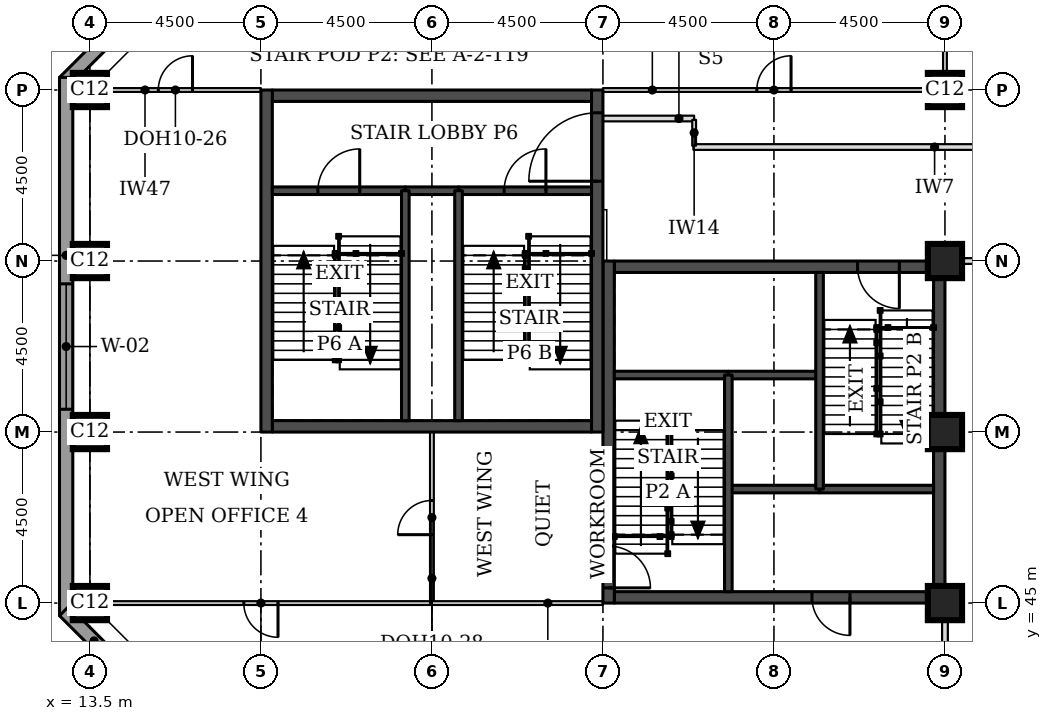
"""IFC4 building model, lengths in metres.
Left out: names, types, materials, properties, quantities, classifications, styles, units other than length and angle.
Written with IfcOpenShell. Run it as: python <this file> out.ifc"""

import sys

from ifc_helpers import new_model, si_unit, direction, frame, frame_2d, origin, origin_2d, place, context, subcontext, project, spatial, rectangle, extrude, element, fill, save


model = new_model("IFC4")
c1 = context("Model", 3, precision=1e-05, world=origin(), true_north=direction((0.0, 1.0)))
c2 = subcontext(c1, "Body", "Model", "MODEL_VIEW")
j1 = project(units=[si_unit("LENGTHUNIT", "METRE"), si_unit("PLANEANGLEUNIT", "RADIAN")], contexts=[c1])
p1 = place(None, origin())
s1 = spatial("IfcSite", under=j1, at=p1, CompositionType="ELEMENT")
p2 = place(p1, origin())
s2 = spatial("IfcBuilding", under=s1, at=p2, CompositionType="ELEMENT")
p3 = place(p2, frame((0.0, 0.0, 226.7)))
s3 = spatial("IfcBuildingStorey", under=s2, at=p3, CompositionType="ELEMENT", Elevation=226.7)
for number, where, z_axis, x_axis in (
    (1, (13.5, 45.0, 0.0), (0.0, 0.0, 1.0), (1.0, 0.0, 0.0)),
    (2, (36.0, 45.0, 0.0), (0.0, 0.0, 1.0), (1.0, 0.0, 0.0)),
    (3, (13.5, 49.5, 0.0), (0.0, 0.0, 1.0), (1.0, 0.0, 0.0)),
    (4, (36.0, 49.5, 0.0), (0.0, 0.0, 1.0), (1.0, 0.0, 0.0)),
    (5, (13.5, 54.0, 0.0), (0.0, 0.0, 1.0), (1.0, 0.0, 0.0)),
    (6, (36.0, 54.0, 0.0), (0.0, 0.0, 1.0), (1.0, 0.0, 0.0)),
    (7, (13.5, 58.5, 0.0), (0.0, 0.0, 1.0), (1.0, 0.0, 0.0)),
    (8, (36.0, 58.5, 0.0), (0.0, 0.0, 1.0), (1.0, 0.0, 0.0)),
):
    element("IfcColumn", number, at=place(p3, frame(where, z_axis=z_axis, x_axis=x_axis)), inside=s3, PredefinedType="COLUMN", context=c2, shape_type="SweptSolid", body=[
        extrude(rectangle(XDim=0.9, YDim=0.9, at=origin_2d()), origin(), (0.0, 0.0, 1.0), 3.7),
    ])
p4 = place(p3, frame((27.3, 45.15, 0.0), z_axis=(0.0, 0.0, 1.0), x_axis=(1.0, 0.0, 0.0)))
e9 = element("IfcWall", 9, at=p4, inside=s3, PredefinedType="SHEAR", context=c2, shape_type="SweptSolid", body=[
    extrude(rectangle(XDim=8.4, YDim=0.3, at=frame_2d((4.2, 0.0))), origin(), (0.0, 0.0, 1.0), 3.7),
])
p5 = place(p4, frame((5.2, 0.0, 0.0)))
e10 = element("IfcOpeningElement", 10, at=p5, cuts=e9, PredefinedType="OPENING", context=c2, shape_type="SweptSolid", body=[
    extrude(rectangle(XDim=1.0, YDim=2.1, at=frame_2d((0.5, 1.05))), frame((0.0, 0.16, 0.0), z_axis=(0.0, -1.0, 0.0), x_axis=(1.0, 0.0, 0.0)), (0.0, 0.0, 1.0), 0.32),
])
p6 = place(p3, frame((27.3, 53.85, 0.0), z_axis=(0.0, 0.0, 1.0), x_axis=(1.0, 0.0, 0.0)))
e11 = element("IfcWall", 11, at=p6, inside=s3, PredefinedType="SHEAR", context=c2, shape_type="SweptSolid", body=[
    extrude(rectangle(XDim=8.4, YDim=0.3, at=frame_2d((4.2, 0.0))), origin(), (0.0, 0.0, 1.0), 3.7),
])
p7 = place(p6, frame((6.4, 0.0, 0.0)))
e12 = element("IfcOpeningElement", 12, at=p7, cuts=e11, PredefinedType="OPENING", context=c2, shape_type="SweptSolid", body=[
    extrude(rectangle(XDim=1.1, YDim=2.1, at=frame_2d((0.55, 1.05))), frame((0.0, 0.16, 0.0), z_axis=(0.0, -1.0, 0.0), x_axis=(1.0, 0.0, 0.0)), (0.0, 0.0, 1.0), 0.32),
])
p8 = place(p3, frame((27.15, 45.0, 0.0), z_axis=(0.0, 0.0, 1.0), x_axis=(0.0, 1.0, 0.0)))
e13 = element("IfcWall", 13, at=p8, inside=s3, PredefinedType="SHEAR", context=c2, shape_type="SweptSolid", body=[
    extrude(rectangle(XDim=9.0, YDim=0.3, at=frame_2d((4.5, 0.0))), origin(), (0.0, 0.0, 1.0), 3.7),
])
p9 = place(p8, frame((0.4, 0.0, 0.0)))
e14 = element("IfcOpeningElement", 14, at=p9, cuts=e13, PredefinedType="OPENING", context=c2, shape_type="SweptSolid", body=[
    extrude(rectangle(XDim=1.1, YDim=2.1, at=frame_2d((0.55, 1.05))), frame((0.0, 0.16, 0.0), z_axis=(0.0, -1.0, 0.0), x_axis=(1.0, 0.0, 0.0)), (0.0, 0.0, 1.0), 0.32),
])
p10 = place(p3, frame((35.85, 45.0, 0.0), z_axis=(0.0, 0.0, 1.0), x_axis=(0.0, 1.0, 0.0)))
e15 = element("IfcWall", 15, at=p10, inside=s3, PredefinedType="SHEAR", context=c2, shape_type="SweptSolid", body=[
    extrude(rectangle(XDim=9.0, YDim=0.3, at=frame_2d((4.5, 0.0))), origin(), (0.0, 0.0, 1.0), 3.7),
])
for number, where, z_axis, x_axis in (
    (16, (18.3, 49.65, 0.0), (0.0, 0.0, 1.0), (1.0, 0.0, 0.0)),
    (17, (18.3, 58.35, 0.0), (0.0, 0.0, 1.0), (1.0, 0.0, 0.0)),
):
    element("IfcWall", number, at=place(p3, frame(where, z_axis=z_axis, x_axis=x_axis)), inside=s3, PredefinedType="SHEAR", context=c2, shape_type="SweptSolid", body=[
        extrude(rectangle(XDim=8.4, YDim=0.3, at=frame_2d((4.2, 0.0))), origin(), (0.0, 0.0, 1.0), 3.7),
    ])
p11 = place(p3, frame((18.15, 49.5, 0.0), z_axis=(0.0, 0.0, 1.0), x_axis=(0.0, 1.0, 0.0)))
e18 = element("IfcWall", 18, at=p11, inside=s3, PredefinedType="SHEAR", context=c2, shape_type="SweptSolid", body=[
    extrude(rectangle(XDim=9.0, YDim=0.3, at=frame_2d((4.5, 0.0))), origin(), (0.0, 0.0, 1.0), 3.7),
])
p12 = place(p3, frame((26.85, 49.5, 0.0), z_axis=(0.0, 0.0, 1.0), x_axis=(0.0, 1.0, 0.0)))
e19 = element("IfcWall", 19, at=p12, inside=s3, PredefinedType="SHEAR", context=c2, shape_type="SweptSolid", body=[
    extrude(rectangle(XDim=9.0, YDim=0.3, at=frame_2d((4.5, 0.0))), origin(), (0.0, 0.0, 1.0), 3.7),
])
p13 = place(p12, frame((6.6, 0.0, 0.0)))
e20 = element("IfcOpeningElement", 20, at=p13, cuts=e19, PredefinedType="OPENING", context=c2, shape_type="SweptSolid", body=[
    extrude(rectangle(XDim=1.8, YDim=2.1, at=frame_2d((0.9, 1.05))), frame((0.0, 0.16, 0.0), z_axis=(0.0, -1.0, 0.0), x_axis=(1.0, 0.0, 0.0)), (0.0, 0.0, 1.0), 0.32),
])
p14 = place(p3, frame((17.792, 63.676, 0.0), z_axis=(0.0, 0.0, 1.0), x_axis=(-0.707106781187, -0.707106781187, 0.0)))
e21 = element("IfcWall", 21, at=p14, inside=s3, PredefinedType="STANDARD", context=c2, shape_type="SweptSolid", body=[
    extrude(rectangle(XDim=7.027, YDim=0.35, at=frame_2d((3.513, 0.0))), origin(), (0.0, 0.0, 1.0), 3.525),
])
p15 = place(p14, frame((1.863, 0.0, 0.9)))
e22 = element("IfcOpeningElement", 22, at=p15, cuts=e21, PredefinedType="OPENING", context=c2, shape_type="SweptSolid", body=[
    extrude(rectangle(XDim=3.3, YDim=1.9, at=frame_2d((1.65, 0.95))), frame((0.0, 0.185, 0.0), z_axis=(0.0, -1.0, 0.0), x_axis=(1.0, 0.0, 0.0)), (0.0, 0.0, 1.0), 0.37),
])
p16 = place(p3, frame((12.875, 58.831, 0.0), z_axis=(0.0, 0.0, 1.0), x_axis=(0.0, -1.0, 0.0)))
e23 = element("IfcWall", 23, at=p16, inside=s3, PredefinedType="STANDARD", context=c2, shape_type="SweptSolid", body=[
    extrude(rectangle(XDim=14.163, YDim=0.35, at=frame_2d((7.081, 0.0))), origin(), (0.0, 0.0, 1.0), 3.525),
])
p17 = place(p16, frame((5.431, 0.0, 0.9)))
e24 = element("IfcOpeningElement", 24, at=p17, cuts=e23, PredefinedType="OPENING", context=c2, shape_type="SweptSolid", body=[
    extrude(rectangle(XDim=3.3, YDim=1.9, at=frame_2d((1.65, 0.95))), frame((0.0, 0.185, 0.0), z_axis=(0.0, -1.0, 0.0), x_axis=(1.0, 0.0, 0.0)), (0.0, 0.0, 1.0), 0.37),
])
p18 = place(p3, frame((12.824, 44.792, 0.0), z_axis=(0.0, 0.0, 1.0), x_axis=(0.707106781187, -0.707106781187, 0.0)))
e25 = element("IfcWall", 25, at=p18, inside=s3, PredefinedType="STANDARD", context=c2, shape_type="SweptSolid", body=[
    extrude(rectangle(XDim=7.027, YDim=0.35, at=frame_2d((3.513, 0.0))), origin(), (0.0, 0.0, 1.0), 3.525),
])
p19 = place(p18, frame((1.863, 0.0, 0.9)))
e26 = element("IfcOpeningElement", 26, at=p19, cuts=e25, PredefinedType="OPENING", context=c2, shape_type="SweptSolid", body=[
    extrude(rectangle(XDim=3.3, YDim=1.9, at=frame_2d((1.65, 0.95))), frame((0.0, 0.185, 0.0), z_axis=(0.0, -1.0, 0.0), x_axis=(1.0, 0.0, 0.0)), (0.0, 0.0, 1.0), 0.37),
])
p20 = place(p3, frame((36.45, 54.0, 0.0), z_axis=(0.0, 0.0, 1.0), x_axis=(1.0, 0.0, 0.0)))
e27 = element("IfcWall", 27, at=p20, inside=s3, PredefinedType="PARTITIONING", context=c2, shape_type="SweptSolid", body=[
    extrude(rectangle(XDim=5.625, YDim=0.15, at=frame_2d((2.812, 0.0))), origin(), (0.0, 0.0, 1.0), 3.55),
])
p21 = place(p3, frame((29.38, 57.0, 0.0), z_axis=(0.0, 0.0, 1.0), x_axis=(1.0, 0.0, 0.0)))
e28 = element("IfcWall", 28, at=p21, inside=s3, PredefinedType="PARTITIONING", context=c2, shape_type="SweptSolid", body=[
    extrude(rectangle(XDim=12.695, YDim=0.15, at=frame_2d((6.348, 0.0))), origin(), (0.0, 0.0, 1.0), 3.55),
])
p22 = place(p3, frame((36.0, 40.95, 0.0), z_axis=(0.0, 0.0, 1.0), x_axis=(0.0, 1.0, 0.0)))
e29 = element("IfcWall", 29, at=p22, inside=s3, PredefinedType="PARTITIONING", context=c2, shape_type="SweptSolid", body=[
    extrude(rectangle(XDim=3.63, YDim=0.15, at=frame_2d((1.815, 0.0))), origin(), (0.0, 0.0, 1.0), 2.8),
])
p23 = place(p22, frame((1.4, 0.0, 0.0)))
e30 = element("IfcOpeningElement", 30, at=p23, cuts=e29, PredefinedType="OPENING", context=c2, shape_type="SweptSolid", body=[
    extrude(rectangle(XDim=0.9, YDim=2.1, at=frame_2d((0.45, 1.05))), frame((0.0, 0.085, 0.0), z_axis=(0.0, -1.0, 0.0), x_axis=(1.0, 0.0, 0.0)), (0.0, 0.0, 1.0), 0.17),
])
p24 = place(p3, frame((36.0, 63.0, 0.0), z_axis=(0.0, 0.0, 1.0), x_axis=(0.0, -1.0, 0.0)))
e31 = element("IfcWall", 31, at=p24, inside=s3, PredefinedType="PARTITIONING", context=c2, shape_type="SweptSolid", body=[
    extrude(rectangle(XDim=4.5, YDim=0.1, at=frame_2d((2.25, 0.0))), origin(), (0.0, 0.0, 1.0), 2.8),
])
p25 = place(p3, frame((36.0, 58.5, 0.0), z_axis=(0.0, 0.0, 1.0), x_axis=(-1.0, 0.0, 0.0)))
e32 = element("IfcWall", 32, at=p25, inside=s3, PredefinedType="PARTITIONING", context=c2, shape_type="SweptSolid", body=[
    extrude(rectangle(XDim=9.0, YDim=0.1, at=frame_2d((4.5, 0.0))), origin(), (0.0, 0.0, 1.0), 2.55),
])
p26 = place(p25, frame((4.05, 0.0, 0.0)))
e33 = element("IfcOpeningElement", 33, at=p26, cuts=e32, PredefinedType="OPENING", context=c2, shape_type="SweptSolid", body=[
    extrude(rectangle(XDim=0.9, YDim=2.1, at=frame_2d((0.45, 1.05))), frame((0.0, 0.06, 0.0), z_axis=(0.0, -1.0, 0.0), x_axis=(1.0, 0.0, 0.0)), (0.0, 0.0, 1.0), 0.12),
])
p27 = place(p3, frame((13.5, 58.5, 0.0), z_axis=(0.0, 0.0, 1.0), x_axis=(1.0, 0.0, 0.0)))
e34 = element("IfcWall", 34, at=p27, inside=s3, PredefinedType="PARTITIONING", context=c2, shape_type="SweptSolid", body=[
    extrude(rectangle(XDim=4.5, YDim=0.1, at=frame_2d((2.25, 0.0))), origin(), (0.0, 0.0, 1.0), 2.55),
])
p28 = place(p27, frame((1.8, 0.0, 0.0)))
e35 = element("IfcOpeningElement", 35, at=p28, cuts=e34, PredefinedType="OPENING", context=c2, shape_type="SweptSolid", body=[
    extrude(rectangle(XDim=0.9, YDim=2.1, at=frame_2d((0.45, 1.05))), frame((0.0, 0.06, 0.0), z_axis=(0.0, -1.0, 0.0), x_axis=(1.0, 0.0, 0.0)), (0.0, 0.0, 1.0), 0.12),
])
p29 = place(p3, frame((22.5, 45.0, 0.0), z_axis=(0.0, 0.0, 1.0), x_axis=(-1.0, 0.0, 0.0)))
e36 = element("IfcWall", 36, at=p29, inside=s3, PredefinedType="PARTITIONING", context=c2, shape_type="SweptSolid", body=[
    extrude(rectangle(XDim=9.0, YDim=0.1, at=frame_2d((4.5, 0.0))), origin(), (0.0, 0.0, 1.0), 2.55),
])
p30 = place(p29, frame((4.05, 0.0, 0.0)))
e37 = element("IfcOpeningElement", 37, at=p30, cuts=e36, PredefinedType="OPENING", context=c2, shape_type="SweptSolid", body=[
    extrude(rectangle(XDim=0.9, YDim=2.1, at=frame_2d((0.45, 1.05))), frame((0.0, 0.06, 0.0), z_axis=(0.0, -1.0, 0.0), x_axis=(1.0, 0.0, 0.0)), (0.0, 0.0, 1.0), 0.12),
])
p31 = place(p3, frame((22.5, 49.5, 0.0), z_axis=(0.0, 0.0, 1.0), x_axis=(0.0, -1.0, 0.0)))
e38 = element("IfcWall", 38, at=p31, inside=s3, PredefinedType="PARTITIONING", context=c2, shape_type="SweptSolid", body=[
    extrude(rectangle(XDim=4.5, YDim=0.1, at=frame_2d((2.25, 0.0))), origin(), (0.0, 0.0, 1.0), 3.55),
])
p32 = place(p31, frame((1.8, 0.0, 0.0)))
e39 = element("IfcOpeningElement", 39, at=p32, cuts=e38, PredefinedType="OPENING", context=c2, shape_type="SweptSolid", body=[
    extrude(rectangle(XDim=0.9, YDim=2.1, at=frame_2d((0.45, 1.05))), frame((0.0, 0.06, 0.0), z_axis=(0.0, -1.0, 0.0), x_axis=(1.0, 0.0, 0.0)), (0.0, 0.0, 1.0), 0.12),
])
p33 = place(p3, frame((22.5, 45.0, 0.0), z_axis=(0.0, 0.0, 1.0), x_axis=(1.0, 0.0, 0.0)))
e40 = element("IfcWall", 40, at=p33, inside=s3, PredefinedType="PARTITIONING", context=c2, shape_type="SweptSolid", body=[
    extrude(rectangle(XDim=4.5, YDim=0.1, at=frame_2d((2.25, 0.0))), origin(), (0.0, 0.0, 1.0), 2.55),
])
p34 = place(p3, frame((27.0, 57.75, 0.0), z_axis=(0.0, 0.0, 1.0), x_axis=(1.0, 0.0, 0.0)))
e41 = element("IfcWall", 41, at=p34, inside=s3, PredefinedType="PARTITIONING", context=c2, shape_type="SweptSolid", body=[
    extrude(rectangle(XDim=2.4, YDim=0.15, at=frame_2d((1.2, 0.0))), origin(), (0.0, 0.0, 1.0), 3.55),
])
p35 = place(p3, frame((29.4, 57.715, 0.0), z_axis=(0.0, 0.0, 1.0), x_axis=(0.0, -1.0, 0.0)))
e42 = element("IfcWall", 42, at=p35, inside=s3, PredefinedType="PARTITIONING", context=c2, shape_type="SweptSolid", body=[
    extrude(rectangle(XDim=0.68, YDim=0.1, at=frame_2d((0.34, 0.0))), origin(), (0.0, 0.0, 1.0), 3.55),
])
p36 = place(p3, frame((30.3, 48.0, 0.0), z_axis=(0.0, 0.0, 1.0), x_axis=(1.0, 0.0, 0.0)))
e43 = element("IfcWall", 43, at=p36, inside=s3, PredefinedType="SOLIDWALL", context=c2, shape_type="SweptSolid", body=[
    extrude(rectangle(XDim=2.4, YDim=0.2, at=frame_2d((1.2, 0.0))), origin(), (0.0, 0.0, 1.0), 3.55),
])
p37 = place(p3, frame((32.7, 48.0, 0.0), z_axis=(0.0, 0.0, 1.0), x_axis=(1.0, 0.0, 0.0)))
e44 = element("IfcWall", 44, at=p37, inside=s3, PredefinedType="SOLIDWALL", context=c2, shape_type="SweptSolid", body=[
    extrude(rectangle(XDim=3.0, YDim=0.2, at=frame_2d((1.5, 0.0))), origin(), (0.0, 0.0, 1.0), 3.55),
])
p38 = place(p3, frame((30.3, 51.0, 0.0), z_axis=(0.0, 0.0, 1.0), x_axis=(1.0, 0.0, 0.0)))
e45 = element("IfcWall", 45, at=p38, inside=s3, PredefinedType="SOLIDWALL", context=c2, shape_type="SweptSolid", body=[
    extrude(rectangle(XDim=2.4, YDim=0.2, at=frame_2d((1.2, 0.0))), origin(), (0.0, 0.0, 1.0), 3.7),
])
p39 = place(p3, frame((27.3, 51.0, 0.0), z_axis=(0.0, 0.0, 1.0), x_axis=(1.0, 0.0, 0.0)))
e46 = element("IfcWall", 46, at=p39, inside=s3, PredefinedType="SOLIDWALL", context=c2, shape_type="SweptSolid", body=[
    extrude(rectangle(XDim=3.0, YDim=0.2, at=frame_2d((1.5, 0.0))), origin(), (0.0, 0.0, 1.0), 3.55),
])
for number, where, z_axis, x_axis in (
    (47, (30.3, 45.3, 0.0), (0.0, 0.0, 1.0), (0.0, 1.0, 0.0)),
    (48, (32.7, 48.0, 0.0), (0.0, 0.0, 1.0), (0.0, 1.0, 0.0)),
):
    element("IfcWall", number, at=place(p3, frame(where, z_axis=z_axis, x_axis=x_axis)), inside=s3, PredefinedType="SOLIDWALL", context=c2, shape_type="SweptSolid", body=[
        extrude(rectangle(XDim=5.7, YDim=0.2, at=frame_2d((2.85, 0.0))), origin(), (0.0, 0.0, 1.0), 3.55),
    ])
p40 = place(p3, frame((21.8, 55.85, 0.0), z_axis=(0.0, 0.0, 1.0), x_axis=(1.0, 0.0, 0.0)))
e49 = element("IfcWall", 49, at=p40, inside=s3, PredefinedType="SOLIDWALL", context=c2, shape_type="SweptSolid", body=[
    extrude(rectangle(XDim=1.4, YDim=0.2, at=frame_2d((0.7, 0.0))), origin(), (0.0, 0.0, 1.0), 3.55),
])
p41 = place(p3, frame((18.3, 55.85, 0.0), z_axis=(0.0, 0.0, 1.0), x_axis=(1.0, 0.0, 0.0)))
e50 = element("IfcWall", 50, at=p41, inside=s3, PredefinedType="SOLIDWALL", context=c2, shape_type="SweptSolid", body=[
    extrude(rectangle(XDim=3.5, YDim=0.2, at=frame_2d((1.75, 0.0))), origin(), (0.0, 0.0, 1.0), 3.55),
])
p42 = place(p41, frame((1.2, 0.0, 0.0)))
e51 = element("IfcOpeningElement", 51, at=p42, cuts=e50, PredefinedType="OPENING", context=c2, shape_type="SweptSolid", body=[
    extrude(rectangle(XDim=1.1, YDim=2.1, at=frame_2d((0.55, 1.05))), frame((0.0, 0.11, 0.0), z_axis=(0.0, -1.0, 0.0), x_axis=(1.0, 0.0, 0.0)), (0.0, 0.0, 1.0), 0.22),
])
p43 = place(p3, frame((23.2, 55.85, 0.0), z_axis=(0.0, 0.0, 1.0), x_axis=(1.0, 0.0, 0.0)))
e52 = element("IfcWall", 52, at=p43, inside=s3, PredefinedType="SOLIDWALL", context=c2, shape_type="SweptSolid", body=[
    extrude(rectangle(XDim=3.5, YDim=0.2, at=frame_2d((1.75, 0.0))), origin(), (0.0, 0.0, 1.0), 3.55),
])
p44 = place(p43, frame((1.2, 0.0, 0.0)))
e53 = element("IfcOpeningElement", 53, at=p44, cuts=e52, PredefinedType="OPENING", context=c2, shape_type="SweptSolid", body=[
    extrude(rectangle(XDim=1.1, YDim=2.1, at=frame_2d((0.55, 1.05))), frame((0.0, 0.11, 0.0), z_axis=(0.0, -1.0, 0.0), x_axis=(1.0, 0.0, 0.0)), (0.0, 0.0, 1.0), 0.22),
])
for number, where, z_axis, x_axis in (
    (54, (21.8, 49.8, 0.0), (0.0, 0.0, 1.0), (0.0, 1.0, 0.0)),
    (55, (23.2, 49.8, 0.0), (0.0, 0.0, 1.0), (0.0, 1.0, 0.0)),
):
    element("IfcWall", number, at=place(p3, frame(where, z_axis=z_axis, x_axis=x_axis)), inside=s3, PredefinedType="SOLIDWALL", context=c2, shape_type="SweptSolid", body=[
        extrude(rectangle(XDim=6.05, YDim=0.2, at=frame_2d((3.025, 0.0))), origin(), (0.0, 0.0, 1.0), 3.55),
    ])
p45 = place(p17, origin())
e56 = element("IfcWindow", 56, at=p45, inside=s3, PartitioningType="SINGLE_PANEL", PredefinedType="WINDOW", context=c2, shape_type="SweptSolid", body=[
    extrude(rectangle(XDim=3.3, YDim=1.9, at=frame_2d((1.65, 0.95))), frame((0.0, 0.085, 0.0), z_axis=(0.0, -1.0, 0.0), x_axis=(1.0, 0.0, 0.0)), (0.0, 0.0, 1.0), 0.06),
])
fill(e24, e56)
p46 = place(p26, frame((0.9, 0.0, 0.0), z_axis=(0.0, 0.0, 1.0), x_axis=(-1.0, 0.0, 0.0)))
e57 = element("IfcDoor", 57, at=p46, inside=s3, OperationType="SINGLE_SWING_RIGHT", PredefinedType="DOOR", context=c2, shape_type="SweptSolid", body=[
    extrude(rectangle(XDim=0.9, YDim=2.1, at=frame_2d((0.45, 1.05))), frame((0.0, 0.025, 0.0), z_axis=(0.0, -1.0, 0.0), x_axis=(1.0, 0.0, 0.0)), (0.0, 0.0, 1.0), 0.05),
])
fill(e33, e57)
p47 = place(p28, origin())
e58 = element("IfcDoor", 58, at=p47, inside=s3, OperationType="SINGLE_SWING_RIGHT", PredefinedType="DOOR", context=c2, shape_type="SweptSolid", body=[
    extrude(rectangle(XDim=0.9, YDim=2.1, at=frame_2d((0.45, 1.05))), frame((0.0, 0.025, 0.0), z_axis=(0.0, -1.0, 0.0), x_axis=(1.0, 0.0, 0.0)), (0.0, 0.0, 1.0), 0.05),
])
fill(e35, e58)
p48 = place(p30, origin())
e59 = element("IfcDoor", 59, at=p48, inside=s3, OperationType="SINGLE_SWING_LEFT", PredefinedType="DOOR", context=c2, shape_type="SweptSolid", body=[
    extrude(rectangle(XDim=0.9, YDim=2.1, at=frame_2d((0.45, 1.05))), frame((0.0, 0.025, 0.0), z_axis=(0.0, -1.0, 0.0), x_axis=(1.0, 0.0, 0.0)), (0.0, 0.0, 1.0), 0.05),
])
fill(e37, e59)
p49 = place(p32, frame((0.9, 0.0, 0.0), z_axis=(0.0, 0.0, 1.0), x_axis=(-1.0, 0.0, 0.0)))
e60 = element("IfcDoor", 60, at=p49, inside=s3, OperationType="SINGLE_SWING_LEFT", PredefinedType="DOOR", context=c2, shape_type="SweptSolid", body=[
    extrude(rectangle(XDim=0.9, YDim=2.1, at=frame_2d((0.45, 1.05))), frame((0.0, 0.025, 0.0), z_axis=(0.0, -1.0, 0.0), x_axis=(1.0, 0.0, 0.0)), (0.0, 0.0, 1.0), 0.05),
])
fill(e39, e60)
p50 = place(p9, frame((1.1, 0.0, 0.0), z_axis=(0.0, 0.0, 1.0), x_axis=(-1.0, 0.0, 0.0)))
e61 = element("IfcDoor", 61, at=p50, inside=s3, OperationType="SINGLE_SWING_RIGHT", PredefinedType="DOOR", context=c2, shape_type="SweptSolid", body=[
    extrude(rectangle(XDim=1.1, YDim=2.1, at=frame_2d((0.55, 1.05))), frame((0.0, 0.025, 0.0), z_axis=(0.0, -1.0, 0.0), x_axis=(1.0, 0.0, 0.0)), (0.0, 0.0, 1.0), 0.05),
])
fill(e14, e61)
p51 = place(p7, frame((1.1, 0.0, 0.0), z_axis=(0.0, 0.0, 1.0), x_axis=(-1.0, 0.0, 0.0)))
e62 = element("IfcDoor", 62, at=p51, inside=s3, OperationType="SINGLE_SWING_LEFT", PredefinedType="DOOR", context=c2, shape_type="SweptSolid", body=[
    extrude(rectangle(XDim=1.1, YDim=2.1, at=frame_2d((0.55, 1.05))), frame((0.0, 0.025, 0.0), z_axis=(0.0, -1.0, 0.0), x_axis=(1.0, 0.0, 0.0)), (0.0, 0.0, 1.0), 0.05),
])
fill(e12, e62)
p52 = place(p5, frame((1.0, 0.0, 0.0), z_axis=(0.0, 0.0, 1.0), x_axis=(-1.0, 0.0, 0.0)))
e63 = element("IfcDoor", 63, at=p52, inside=s3, OperationType="SINGLE_SWING_LEFT", PredefinedType="DOOR", context=c2, shape_type="SweptSolid", body=[
    extrude(rectangle(XDim=1.0, YDim=2.1, at=frame_2d((0.5, 1.05))), frame((0.0, 0.025, 0.0), z_axis=(0.0, -1.0, 0.0), x_axis=(1.0, 0.0, 0.0)), (0.0, 0.0, 1.0), 0.05),
])
fill(e10, e63)
p53 = place(p42, origin())
e64 = element("IfcDoor", 64, at=p53, inside=s3, OperationType="SINGLE_SWING_RIGHT", PredefinedType="DOOR", context=c2, shape_type="SweptSolid", body=[
    extrude(rectangle(XDim=1.1, YDim=2.1, at=frame_2d((0.55, 1.05))), frame((0.0, 0.025, 0.0), z_axis=(0.0, -1.0, 0.0), x_axis=(1.0, 0.0, 0.0)), (0.0, 0.0, 1.0), 0.05),
])
fill(e51, e64)
p54 = place(p44, origin())
e65 = element("IfcDoor", 65, at=p54, inside=s3, OperationType="SINGLE_SWING_RIGHT", PredefinedType="DOOR", context=c2, shape_type="SweptSolid", body=[
    extrude(rectangle(XDim=1.1, YDim=2.1, at=frame_2d((0.55, 1.05))), frame((0.0, 0.025, 0.0), z_axis=(0.0, -1.0, 0.0), x_axis=(1.0, 0.0, 0.0)), (0.0, 0.0, 1.0), 0.05),
])
fill(e53, e65)
p55 = place(p13, origin())
e66 = element("IfcDoor", 66, at=p55, inside=s3, OperationType="SINGLE_SWING_LEFT", PredefinedType="DOOR", context=c2, shape_type="SweptSolid", body=[
    extrude(rectangle(XDim=1.8, YDim=2.1, at=frame_2d((0.9, 1.05))), frame((0.0, 0.025, 0.0), z_axis=(0.0, -1.0, 0.0), x_axis=(1.0, 0.0, 0.0)), (0.0, 0.0, 1.0), 0.05),
])
fill(e20, e66)
save(model, sys.argv[1])
